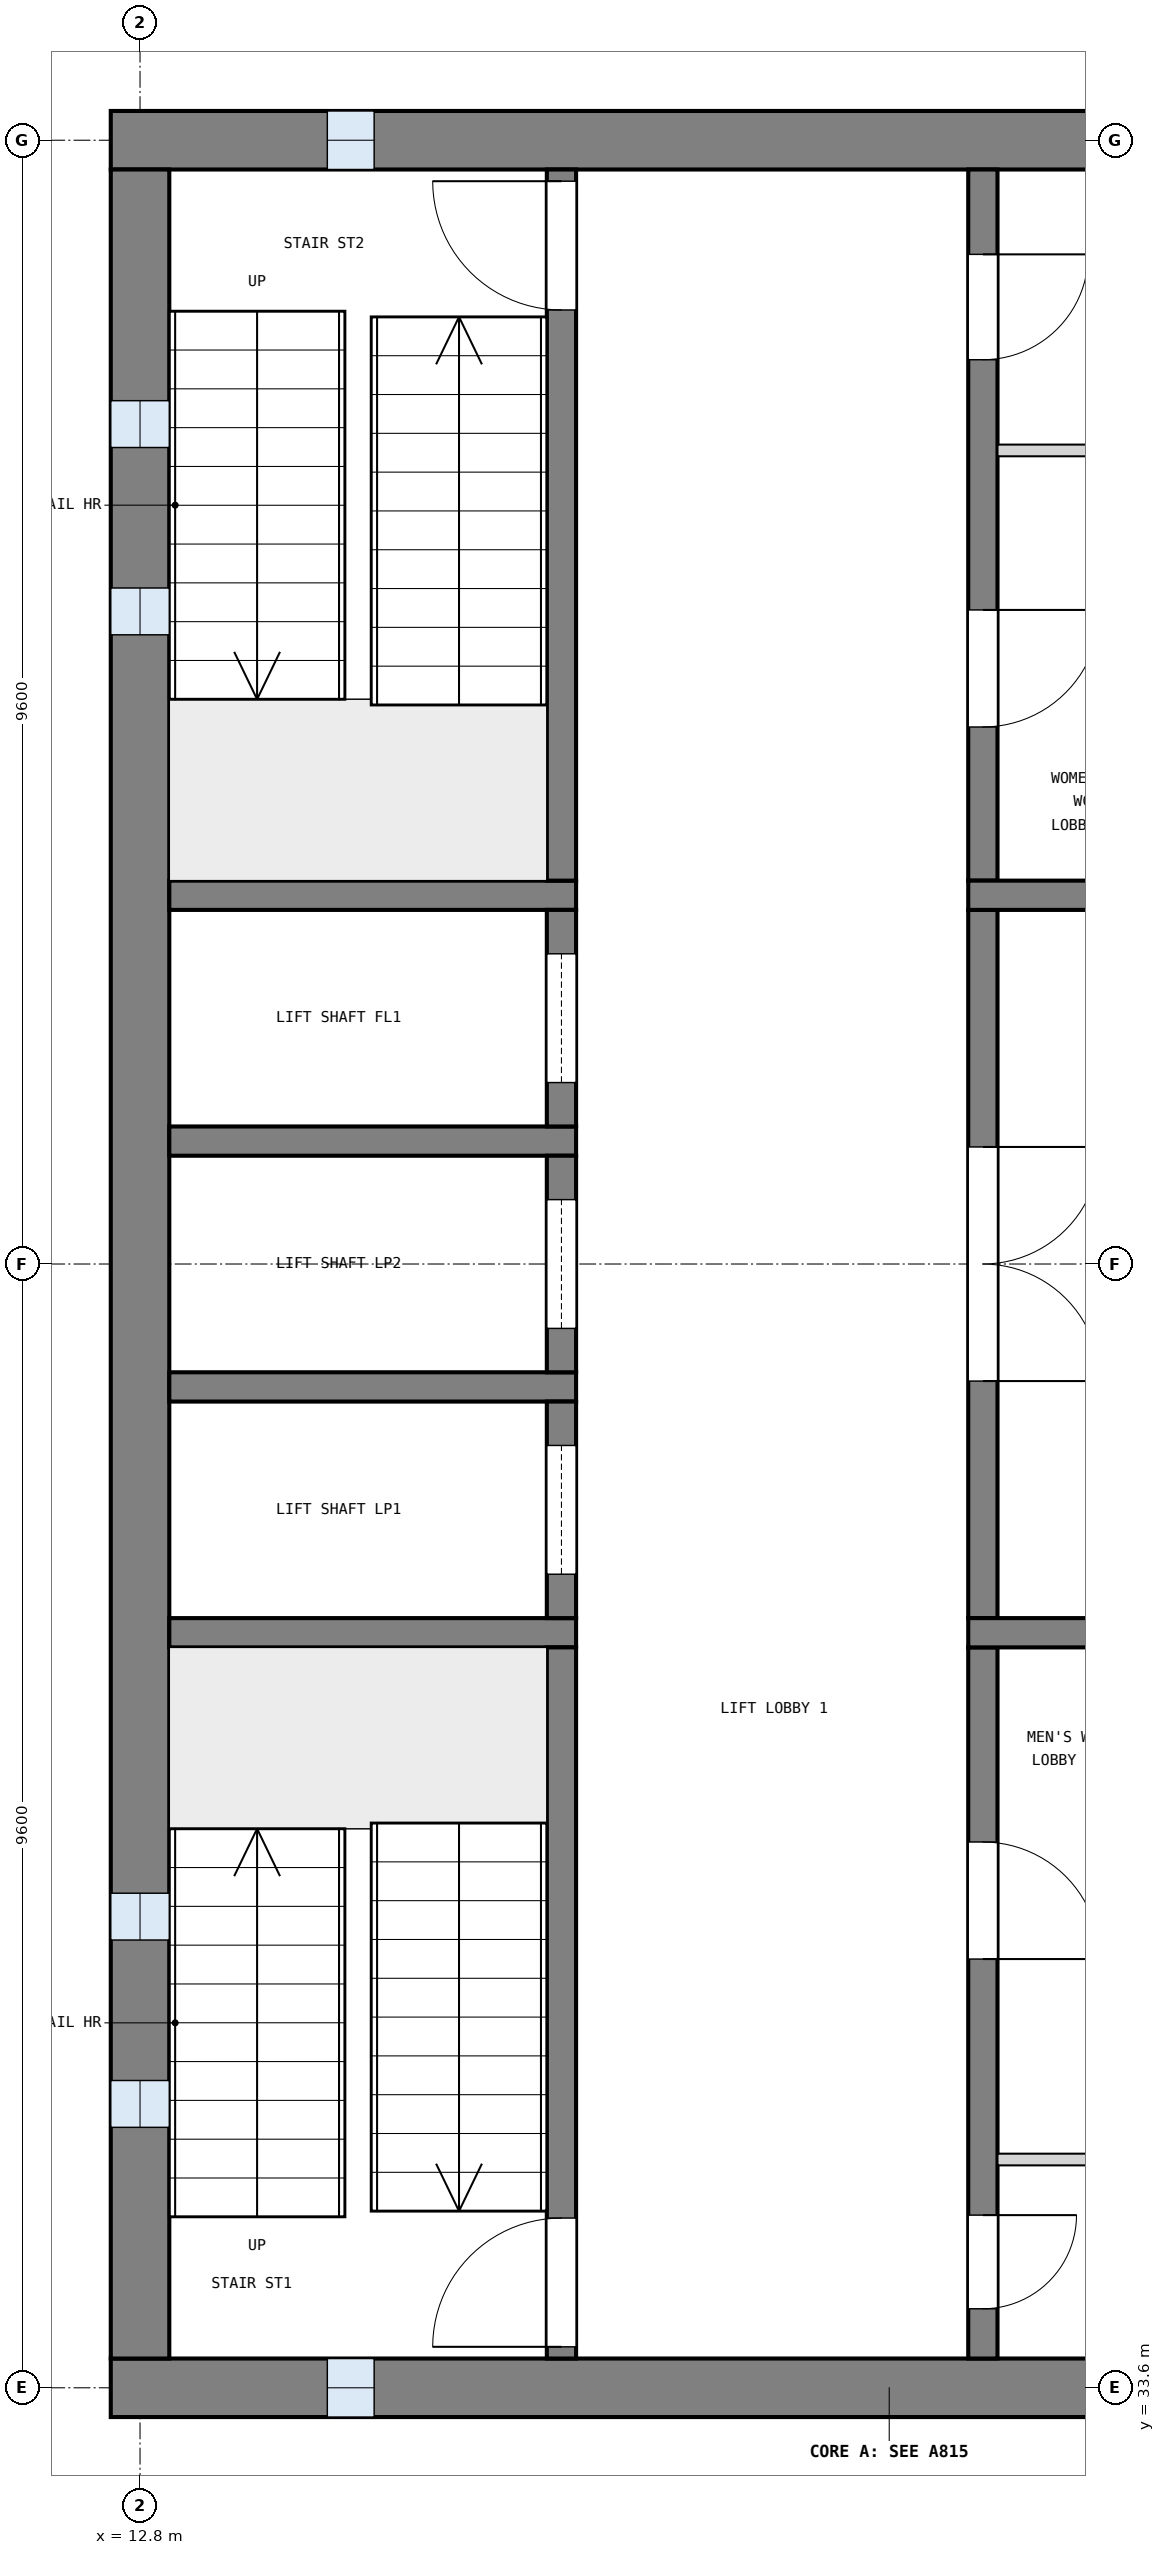
"""IFC4 building model, lengths in metres.
Left out: names, types, materials, properties, quantities, classifications, styles, units other than length and angle.
Written with IfcOpenShell. Run it as: python <this file> out.ifc"""

import sys

from ifc_helpers import new_model, si_unit, direction, frame, frame_2d, origin, place, context, subcontext, project, spatial, rectangle, extrude, element, fill, save


model = new_model("IFC4")
c1 = context("Model", 3, precision=1e-05, world=origin(), true_north=direction((0.0, 1.0)))
c2 = subcontext(c1, "Body", "Model", "MODEL_VIEW")
j1 = project(units=[si_unit("LENGTHUNIT", "METRE"), si_unit("PLANEANGLEUNIT", "RADIAN")], contexts=[c1])
p1 = place(None, origin())
s1 = spatial("IfcSite", under=j1, at=p1, CompositionType="ELEMENT")
p2 = place(p1, origin())
s2 = spatial("IfcBuilding", under=s1, at=p2, CompositionType="ELEMENT")
p3 = place(p2, frame((0.0, 0.0, 52.2)))
s3 = spatial("IfcBuildingStorey", under=s2, at=p3, CompositionType="ELEMENT", Elevation=52.2)
p4 = place(p3, frame((12.55, 52.8, 0.0), z_axis=(0.0, 0.0, 1.0), x_axis=(1.0, 0.0, 0.0)))
e1 = element("IfcWall", 1, at=p4, inside=s3, PredefinedType="SHEAR", context=c2, shape_type="SweptSolid", body=[
    extrude(rectangle(XDim=13.3, YDim=0.5, at=frame_2d((6.65, 0.0))), origin(), (0.0, 0.0, 1.0), 3.9),
])
p5 = place(p4, frame((1.85, 0.0, 1.0)))
e2 = element("IfcOpeningElement", 2, at=p5, cuts=e1, PredefinedType="OPENING", context=c2, shape_type="SweptSolid", body=[
    extrude(rectangle(XDim=0.4, YDim=2.0, at=frame_2d((0.2, 1.0))), frame((0.0, 0.26, 0.0), z_axis=(0.0, -1.0, 0.0), x_axis=(1.0, 0.0, 0.0)), (0.0, 0.0, 1.0), 0.52),
])
p6 = place(p3, frame((12.55, 33.6, 0.0), z_axis=(0.0, 0.0, 1.0), x_axis=(1.0, 0.0, 0.0)))
e3 = element("IfcWall", 3, at=p6, inside=s3, PredefinedType="SHEAR", context=c2, shape_type="SweptSolid", body=[
    extrude(rectangle(XDim=13.3, YDim=0.5, at=frame_2d((6.65, 0.0))), origin(), (0.0, 0.0, 1.0), 3.9),
])
p7 = place(p6, frame((1.85, 0.0, 1.0)))
e4 = element("IfcOpeningElement", 4, at=p7, cuts=e3, PredefinedType="OPENING", context=c2, shape_type="SweptSolid", body=[
    extrude(rectangle(XDim=0.4, YDim=2.0, at=frame_2d((0.2, 1.0))), frame((0.0, 0.26, 0.0), z_axis=(0.0, -1.0, 0.0), x_axis=(1.0, 0.0, 0.0)), (0.0, 0.0, 1.0), 0.52),
])
p8 = place(p3, frame((12.8, 33.85, 0.0), z_axis=(0.0, 0.0, 1.0), x_axis=(0.0, 1.0, 0.0)))
e5 = element("IfcWall", 5, at=p8, inside=s3, PredefinedType="SHEAR", context=c2, shape_type="SweptSolid", body=[
    extrude(rectangle(XDim=18.7, YDim=0.5, at=frame_2d((9.35, 0.0))), origin(), (0.0, 0.0, 1.0), 3.9),
])
p9 = place(p8, frame((1.975, 0.0, 1.0)))
e6 = element("IfcOpeningElement", 6, at=p9, cuts=e5, PredefinedType="OPENING", context=c2, shape_type="SweptSolid", body=[
    extrude(rectangle(XDim=0.4, YDim=2.0, at=frame_2d((0.2, 1.0))), frame((0.0, 0.26, 0.0), z_axis=(0.0, -1.0, 0.0), x_axis=(1.0, 0.0, 0.0)), (0.0, 0.0, 1.0), 0.52),
])
p10 = place(p8, frame((3.575, 0.0, 1.0)))
e7 = element("IfcOpeningElement", 7, at=p10, cuts=e5, PredefinedType="OPENING", context=c2, shape_type="SweptSolid", body=[
    extrude(rectangle(XDim=0.4, YDim=2.0, at=frame_2d((0.2, 1.0))), frame((0.0, 0.26, 0.0), z_axis=(0.0, -1.0, 0.0), x_axis=(1.0, 0.0, 0.0)), (0.0, 0.0, 1.0), 0.52),
])
p11 = place(p8, frame((14.725, 0.0, 1.0)))
e8 = element("IfcOpeningElement", 8, at=p11, cuts=e5, PredefinedType="OPENING", context=c2, shape_type="SweptSolid", body=[
    extrude(rectangle(XDim=0.4, YDim=2.0, at=frame_2d((0.2, 1.0))), frame((0.0, 0.26, 0.0), z_axis=(0.0, -1.0, 0.0), x_axis=(1.0, 0.0, 0.0)), (0.0, 0.0, 1.0), 0.52),
])
p12 = place(p8, frame((16.325, 0.0, 1.0)))
e9 = element("IfcOpeningElement", 9, at=p12, cuts=e5, PredefinedType="OPENING", context=c2, shape_type="SweptSolid", body=[
    extrude(rectangle(XDim=0.4, YDim=2.0, at=frame_2d((0.2, 1.0))), frame((0.0, 0.26, 0.0), z_axis=(0.0, -1.0, 0.0), x_axis=(1.0, 0.0, 0.0)), (0.0, 0.0, 1.0), 0.52),
])
for number, where, z_axis, x_axis in (
    (10, (13.05, 40.05, 0.0), (0.0, 0.0, 1.0), (1.0, 0.0, 0.0)),
    (11, (13.05, 42.15, 0.0), (0.0, 0.0, 1.0), (1.0, 0.0, 0.0)),
    (12, (13.05, 44.25, 0.0), (0.0, 0.0, 1.0), (1.0, 0.0, 0.0)),
    (13, (13.05, 46.35, 0.0), (0.0, 0.0, 1.0), (1.0, 0.0, 0.0)),
):
    element("IfcWall", number, at=place(p3, frame(where, z_axis=z_axis, x_axis=x_axis)), inside=s3, PredefinedType="SOLIDWALL", context=c2, shape_type="SweptSolid", body=[
        extrude(rectangle(XDim=3.475, YDim=0.25, at=frame_2d((1.737, 0.0))), origin(), (0.0, 0.0, 1.0), 3.6),
    ])
p13 = place(p3, frame((16.4, 33.85, 0.0), z_axis=(0.0, 0.0, 1.0), x_axis=(0.0, 1.0, 0.0)))
e14 = element("IfcWall", 14, at=p13, inside=s3, PredefinedType="SOLIDWALL", context=c2, shape_type="SweptSolid", body=[
    extrude(rectangle(XDim=6.075, YDim=0.25, at=frame_2d((3.038, 0.0))), origin(), (0.0, 0.0, 1.0), 3.6),
])
p14 = place(p13, frame((0.1, 0.0, 0.0)))
e15 = element("IfcOpeningElement", 15, at=p14, cuts=e14, PredefinedType="OPENING", context=c2, shape_type="SweptSolid", body=[
    extrude(rectangle(XDim=1.1, YDim=2.1, at=frame_2d((0.55, 1.05))), frame((0.0, 0.135, 0.0), z_axis=(0.0, -1.0, 0.0), x_axis=(1.0, 0.0, 0.0)), (0.0, 0.0, 1.0), 0.27),
])
p15 = place(p3, frame((16.4, 40.175, 0.0), z_axis=(0.0, 0.0, 1.0), x_axis=(0.0, 1.0, 0.0)))
e16 = element("IfcWall", 16, at=p15, inside=s3, PredefinedType="SOLIDWALL", context=c2, shape_type="SweptSolid", body=[
    extrude(rectangle(XDim=1.85, YDim=0.25, at=frame_2d((0.925, 0.0))), origin(), (0.0, 0.0, 1.0), 3.6),
])
p16 = place(p15, frame((0.375, 0.0, 0.0)))
e17 = element("IfcOpeningElement", 17, at=p16, cuts=e16, PredefinedType="OPENING", context=c2, shape_type="SweptSolid", body=[
    extrude(rectangle(XDim=1.1, YDim=2.1, at=frame_2d((0.55, 1.05))), frame((0.0, 0.135, 0.0), z_axis=(0.0, -1.0, 0.0), x_axis=(1.0, 0.0, 0.0)), (0.0, 0.0, 1.0), 0.27),
])
p17 = place(p3, frame((16.4, 42.275, 0.0), z_axis=(0.0, 0.0, 1.0), x_axis=(0.0, 1.0, 0.0)))
e18 = element("IfcWall", 18, at=p17, inside=s3, PredefinedType="SOLIDWALL", context=c2, shape_type="SweptSolid", body=[
    extrude(rectangle(XDim=1.85, YDim=0.25, at=frame_2d((0.925, 0.0))), origin(), (0.0, 0.0, 1.0), 3.6),
])
p18 = place(p17, frame((0.375, 0.0, 0.0)))
e19 = element("IfcOpeningElement", 19, at=p18, cuts=e18, PredefinedType="OPENING", context=c2, shape_type="SweptSolid", body=[
    extrude(rectangle(XDim=1.1, YDim=2.1, at=frame_2d((0.55, 1.05))), frame((0.0, 0.135, 0.0), z_axis=(0.0, -1.0, 0.0), x_axis=(1.0, 0.0, 0.0)), (0.0, 0.0, 1.0), 0.27),
])
p19 = place(p3, frame((16.4, 44.375, 0.0), z_axis=(0.0, 0.0, 1.0), x_axis=(0.0, 1.0, 0.0)))
e20 = element("IfcWall", 20, at=p19, inside=s3, PredefinedType="SOLIDWALL", context=c2, shape_type="SweptSolid", body=[
    extrude(rectangle(XDim=1.85, YDim=0.25, at=frame_2d((0.925, 0.0))), origin(), (0.0, 0.0, 1.0), 3.6),
])
p20 = place(p19, frame((0.375, 0.0, 0.0)))
e21 = element("IfcOpeningElement", 21, at=p20, cuts=e20, PredefinedType="OPENING", context=c2, shape_type="SweptSolid", body=[
    extrude(rectangle(XDim=1.1, YDim=2.1, at=frame_2d((0.55, 1.05))), frame((0.0, 0.135, 0.0), z_axis=(0.0, -1.0, 0.0), x_axis=(1.0, 0.0, 0.0)), (0.0, 0.0, 1.0), 0.27),
])
p21 = place(p3, frame((16.4, 46.475, 0.0), z_axis=(0.0, 0.0, 1.0), x_axis=(0.0, 1.0, 0.0)))
e22 = element("IfcWall", 22, at=p21, inside=s3, PredefinedType="SOLIDWALL", context=c2, shape_type="SweptSolid", body=[
    extrude(rectangle(XDim=6.075, YDim=0.25, at=frame_2d((3.038, 0.0))), origin(), (0.0, 0.0, 1.0), 3.6),
])
p22 = place(p21, frame((4.875, 0.0, 0.0)))
e23 = element("IfcOpeningElement", 23, at=p22, cuts=e22, PredefinedType="OPENING", context=c2, shape_type="SweptSolid", body=[
    extrude(rectangle(XDim=1.1, YDim=2.1, at=frame_2d((0.55, 1.05))), frame((0.0, 0.135, 0.0), z_axis=(0.0, -1.0, 0.0), x_axis=(1.0, 0.0, 0.0)), (0.0, 0.0, 1.0), 0.27),
])
p23 = place(p3, frame((20.0, 33.85, 0.0), z_axis=(0.0, 0.0, 1.0), x_axis=(0.0, 1.0, 0.0)))
e24 = element("IfcWall", 24, at=p23, inside=s3, PredefinedType="SOLIDWALL", context=c2, shape_type="SweptSolid", body=[
    extrude(rectangle(XDim=6.075, YDim=0.25, at=frame_2d((3.038, 0.0))), origin(), (0.0, 0.0, 1.0), 3.6),
])
p24 = place(p23, frame((0.425, 0.0, 0.0)))
e25 = element("IfcOpeningElement", 25, at=p24, cuts=e24, PredefinedType="OPENING", context=c2, shape_type="SweptSolid", body=[
    extrude(rectangle(XDim=0.8, YDim=2.1, at=frame_2d((0.4, 1.05))), frame((0.0, 0.135, 0.0), z_axis=(0.0, -1.0, 0.0), x_axis=(1.0, 0.0, 0.0)), (0.0, 0.0, 1.0), 0.27),
])
p25 = place(p23, frame((3.413, 0.0, 0.0)))
e26 = element("IfcOpeningElement", 26, at=p25, cuts=e24, PredefinedType="OPENING", context=c2, shape_type="SweptSolid", body=[
    extrude(rectangle(XDim=1.0, YDim=2.1, at=frame_2d((0.5, 1.05))), frame((0.0, 0.135, 0.0), z_axis=(0.0, -1.0, 0.0), x_axis=(1.0, 0.0, 0.0)), (0.0, 0.0, 1.0), 0.27),
])
p26 = place(p3, frame((20.0, 40.175, 0.0), z_axis=(0.0, 0.0, 1.0), x_axis=(0.0, 1.0, 0.0)))
e27 = element("IfcWall", 27, at=p26, inside=s3, PredefinedType="SOLIDWALL", context=c2, shape_type="SweptSolid", body=[
    extrude(rectangle(XDim=6.05, YDim=0.25, at=frame_2d((3.025, 0.0))), origin(), (0.0, 0.0, 1.0), 3.6),
])
p27 = place(p26, frame((2.025, 0.0, 0.0)))
e28 = element("IfcOpeningElement", 28, at=p27, cuts=e27, PredefinedType="OPENING", context=c2, shape_type="SweptSolid", body=[
    extrude(rectangle(XDim=2.0, YDim=2.1, at=frame_2d((1.0, 1.05))), frame((0.0, 0.135, 0.0), z_axis=(0.0, -1.0, 0.0), x_axis=(1.0, 0.0, 0.0)), (0.0, 0.0, 1.0), 0.27),
])
p28 = place(p3, frame((20.0, 46.475, 0.0), z_axis=(0.0, 0.0, 1.0), x_axis=(0.0, 1.0, 0.0)))
e29 = element("IfcWall", 29, at=p28, inside=s3, PredefinedType="SOLIDWALL", context=c2, shape_type="SweptSolid", body=[
    extrude(rectangle(XDim=6.075, YDim=0.25, at=frame_2d((3.038, 0.0))), origin(), (0.0, 0.0, 1.0), 3.6),
])
p29 = place(p28, frame((1.312, 0.0, 0.0)))
e30 = element("IfcOpeningElement", 30, at=p29, cuts=e29, PredefinedType="OPENING", context=c2, shape_type="SweptSolid", body=[
    extrude(rectangle(XDim=1.0, YDim=2.1, at=frame_2d((0.5, 1.05))), frame((0.0, 0.135, 0.0), z_axis=(0.0, -1.0, 0.0), x_axis=(1.0, 0.0, 0.0)), (0.0, 0.0, 1.0), 0.27),
])
p30 = place(p28, frame((4.45, 0.0, 0.0)))
e31 = element("IfcOpeningElement", 31, at=p30, cuts=e29, PredefinedType="OPENING", context=c2, shape_type="SweptSolid", body=[
    extrude(rectangle(XDim=0.9, YDim=2.1, at=frame_2d((0.45, 1.05))), frame((0.0, 0.135, 0.0), z_axis=(0.0, -1.0, 0.0), x_axis=(1.0, 0.0, 0.0)), (0.0, 0.0, 1.0), 0.27),
])
for number, where, z_axis, x_axis in (
    (32, (19.875, 40.05, 0.0), (0.0, 0.0, 1.0), (1.0, 0.0, 0.0)),
    (33, (19.875, 46.35, 0.0), (0.0, 0.0, 1.0), (1.0, 0.0, 0.0)),
):
    element("IfcWall", number, at=place(p3, frame(where, z_axis=z_axis, x_axis=x_axis)), inside=s3, PredefinedType="SOLIDWALL", context=c2, shape_type="SweptSolid", body=[
        extrude(rectangle(XDim=5.475, YDim=0.25, at=frame_2d((2.738, 0.0))), origin(), (0.0, 0.0, 1.0), 3.6),
    ])
for number, where, z_axis, x_axis in (
    (34, (20.125, 35.55, 0.0), (0.0, 0.0, 1.0), (1.0, 0.0, 0.0)),
    (35, (20.125, 50.15, 0.0), (0.0, 0.0, 1.0), (1.0, 0.0, 0.0)),
):
    element("IfcWall", number, at=place(p3, frame(where, z_axis=z_axis, x_axis=x_axis)), inside=s3, PredefinedType="PARTITIONING", context=c2, shape_type="SweptSolid", body=[
        extrude(rectangle(XDim=5.225, YDim=0.1, at=frame_2d((2.613, 0.0))), origin(), (0.0, 0.0, 1.0), 3.6),
    ])
p31 = place(p9, origin())
e36 = element("IfcWindow", 36, at=p31, inside=s3, PartitioningType="SINGLE_PANEL", PredefinedType="WINDOW", context=c2, shape_type="SweptSolid", body=[
    extrude(rectangle(XDim=0.4, YDim=2.0, at=frame_2d((0.2, 1.0))), frame((0.0, 0.03, 0.0), z_axis=(0.0, -1.0, 0.0), x_axis=(1.0, 0.0, 0.0)), (0.0, 0.0, 1.0), 0.06),
])
fill(e6, e36)
p32 = place(p10, origin())
e37 = element("IfcWindow", 37, at=p32, inside=s3, PartitioningType="SINGLE_PANEL", PredefinedType="WINDOW", context=c2, shape_type="SweptSolid", body=[
    extrude(rectangle(XDim=0.4, YDim=2.0, at=frame_2d((0.2, 1.0))), frame((0.0, 0.03, 0.0), z_axis=(0.0, -1.0, 0.0), x_axis=(1.0, 0.0, 0.0)), (0.0, 0.0, 1.0), 0.06),
])
fill(e7, e37)
p33 = place(p11, origin())
e38 = element("IfcWindow", 38, at=p33, inside=s3, PartitioningType="SINGLE_PANEL", PredefinedType="WINDOW", context=c2, shape_type="SweptSolid", body=[
    extrude(rectangle(XDim=0.4, YDim=2.0, at=frame_2d((0.2, 1.0))), frame((0.0, 0.03, 0.0), z_axis=(0.0, -1.0, 0.0), x_axis=(1.0, 0.0, 0.0)), (0.0, 0.0, 1.0), 0.06),
])
fill(e8, e38)
p34 = place(p12, origin())
e39 = element("IfcWindow", 39, at=p34, inside=s3, PartitioningType="SINGLE_PANEL", PredefinedType="WINDOW", context=c2, shape_type="SweptSolid", body=[
    extrude(rectangle(XDim=0.4, YDim=2.0, at=frame_2d((0.2, 1.0))), frame((0.0, 0.03, 0.0), z_axis=(0.0, -1.0, 0.0), x_axis=(1.0, 0.0, 0.0)), (0.0, 0.0, 1.0), 0.06),
])
fill(e9, e39)
p35 = place(p7, origin())
e40 = element("IfcWindow", 40, at=p35, inside=s3, PartitioningType="SINGLE_PANEL", PredefinedType="WINDOW", context=c2, shape_type="SweptSolid", body=[
    extrude(rectangle(XDim=0.4, YDim=2.0, at=frame_2d((0.2, 1.0))), frame((0.0, 0.03, 0.0), z_axis=(0.0, -1.0, 0.0), x_axis=(1.0, 0.0, 0.0)), (0.0, 0.0, 1.0), 0.06),
])
fill(e4, e40)
p36 = place(p5, origin())
e41 = element("IfcWindow", 41, at=p36, inside=s3, PartitioningType="SINGLE_PANEL", PredefinedType="WINDOW", context=c2, shape_type="SweptSolid", body=[
    extrude(rectangle(XDim=0.4, YDim=2.0, at=frame_2d((0.2, 1.0))), frame((0.0, 0.03, 0.0), z_axis=(0.0, -1.0, 0.0), x_axis=(1.0, 0.0, 0.0)), (0.0, 0.0, 1.0), 0.06),
])
fill(e2, e41)
p37 = place(p14, origin())
e42 = element("IfcDoor", 42, at=p37, inside=s3, OperationType="SINGLE_SWING_LEFT", PredefinedType="DOOR", context=c2, shape_type="SweptSolid", body=[
    extrude(rectangle(XDim=1.1, YDim=2.1, at=frame_2d((0.55, 1.05))), frame((0.0, 0.025, 0.0), z_axis=(0.0, -1.0, 0.0), x_axis=(1.0, 0.0, 0.0)), (0.0, 0.0, 1.0), 0.05),
])
fill(e15, e42)
p38 = place(p22, origin())
e43 = element("IfcDoor", 43, at=p38, inside=s3, OperationType="SINGLE_SWING_RIGHT", PredefinedType="DOOR", context=c2, shape_type="SweptSolid", body=[
    extrude(rectangle(XDim=1.1, YDim=2.1, at=frame_2d((0.55, 1.05))), frame((0.0, 0.025, 0.0), z_axis=(0.0, -1.0, 0.0), x_axis=(1.0, 0.0, 0.0)), (0.0, 0.0, 1.0), 0.05),
])
fill(e23, e43)
p39 = place(p16, origin())
e44 = element("IfcDoor", 44, at=p39, inside=s3, OperationType="SLIDING_TO_LEFT", PredefinedType="DOOR", context=c2, shape_type="SweptSolid", body=[
    extrude(rectangle(XDim=1.1, YDim=2.1, at=frame_2d((0.55, 1.05))), frame((0.0, 0.025, 0.0), z_axis=(0.0, -1.0, 0.0), x_axis=(1.0, 0.0, 0.0)), (0.0, 0.0, 1.0), 0.05),
])
fill(e17, e44)
p40 = place(p18, origin())
e45 = element("IfcDoor", 45, at=p40, inside=s3, OperationType="SLIDING_TO_LEFT", PredefinedType="DOOR", context=c2, shape_type="SweptSolid", body=[
    extrude(rectangle(XDim=1.1, YDim=2.1, at=frame_2d((0.55, 1.05))), frame((0.0, 0.025, 0.0), z_axis=(0.0, -1.0, 0.0), x_axis=(1.0, 0.0, 0.0)), (0.0, 0.0, 1.0), 0.05),
])
fill(e19, e45)
p41 = place(p20, origin())
e46 = element("IfcDoor", 46, at=p41, inside=s3, OperationType="SLIDING_TO_LEFT", PredefinedType="DOOR", context=c2, shape_type="SweptSolid", body=[
    extrude(rectangle(XDim=1.1, YDim=2.1, at=frame_2d((0.55, 1.05))), frame((0.0, 0.025, 0.0), z_axis=(0.0, -1.0, 0.0), x_axis=(1.0, 0.0, 0.0)), (0.0, 0.0, 1.0), 0.05),
])
fill(e21, e46)
p42 = place(p27, frame((2.0, 0.0, 0.0), z_axis=(0.0, 0.0, 1.0), x_axis=(-1.0, 0.0, 0.0)))
e47 = element("IfcDoor", 47, at=p42, inside=s3, OperationType="DOUBLE_DOOR_SINGLE_SWING", PredefinedType="DOOR", context=c2, shape_type="SweptSolid", body=[
    extrude(rectangle(XDim=2.0, YDim=2.1, at=frame_2d((1.0, 1.05))), frame((0.0, 0.025, 0.0), z_axis=(0.0, -1.0, 0.0), x_axis=(1.0, 0.0, 0.0)), (0.0, 0.0, 1.0), 0.05),
])
fill(e28, e47)
p43 = place(p24, frame((0.8, 0.0, 0.0), z_axis=(0.0, 0.0, 1.0), x_axis=(-1.0, 0.0, 0.0)))
e48 = element("IfcDoor", 48, at=p43, inside=s3, OperationType="SINGLE_SWING_LEFT", PredefinedType="DOOR", context=c2, shape_type="SweptSolid", body=[
    extrude(rectangle(XDim=0.8, YDim=2.1, at=frame_2d((0.4, 1.05))), frame((0.0, 0.025, 0.0), z_axis=(0.0, -1.0, 0.0), x_axis=(1.0, 0.0, 0.0)), (0.0, 0.0, 1.0), 0.05),
])
fill(e25, e48)
p44 = place(p25, frame((1.0, 0.0, 0.0), z_axis=(0.0, 0.0, 1.0), x_axis=(-1.0, 0.0, 0.0)))
e49 = element("IfcDoor", 49, at=p44, inside=s3, OperationType="SINGLE_SWING_RIGHT", PredefinedType="DOOR", context=c2, shape_type="SweptSolid", body=[
    extrude(rectangle(XDim=1.0, YDim=2.1, at=frame_2d((0.5, 1.05))), frame((0.0, 0.025, 0.0), z_axis=(0.0, -1.0, 0.0), x_axis=(1.0, 0.0, 0.0)), (0.0, 0.0, 1.0), 0.05),
])
fill(e26, e49)
p45 = place(p29, frame((1.0, 0.0, 0.0), z_axis=(0.0, 0.0, 1.0), x_axis=(-1.0, 0.0, 0.0)))
e50 = element("IfcDoor", 50, at=p45, inside=s3, OperationType="SINGLE_SWING_LEFT", PredefinedType="DOOR", context=c2, shape_type="SweptSolid", body=[
    extrude(rectangle(XDim=1.0, YDim=2.1, at=frame_2d((0.5, 1.05))), frame((0.0, 0.025, 0.0), z_axis=(0.0, -1.0, 0.0), x_axis=(1.0, 0.0, 0.0)), (0.0, 0.0, 1.0), 0.05),
])
fill(e30, e50)
p46 = place(p30, frame((0.9, 0.0, 0.0), z_axis=(0.0, 0.0, 1.0), x_axis=(-1.0, 0.0, 0.0)))
e51 = element("IfcDoor", 51, at=p46, inside=s3, OperationType="SINGLE_SWING_LEFT", PredefinedType="DOOR", context=c2, shape_type="SweptSolid", body=[
    extrude(rectangle(XDim=0.9, YDim=2.1, at=frame_2d((0.45, 1.05))), frame((0.0, 0.025, 0.0), z_axis=(0.0, -1.0, 0.0), x_axis=(1.0, 0.0, 0.0)), (0.0, 0.0, 1.0), 0.05),
])
fill(e31, e51)
save(model, sys.argv[1])
